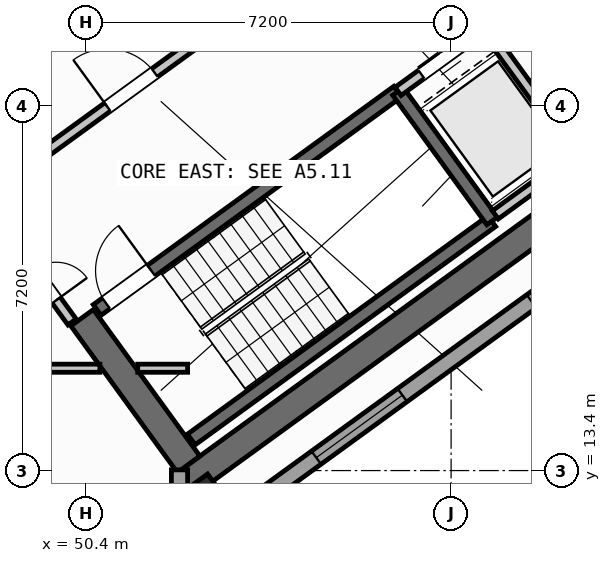
"""IFC4 building model, lengths in metres.
Left out: names, types, materials, properties, quantities, classifications, styles, units other than length and angle.
Written with IfcOpenShell. Run it as: python <this file> out.ifc"""

import sys

from ifc_helpers import new_model, si_unit, direction, frame, frame_2d, origin, origin_2d, place, context, subcontext, project, spatial, rectangle, hollow_rectangle, extrude, source, transform, mapped, element, fill, save


model = new_model("IFC4")
c1 = context("Model", 3, precision=1e-05, world=origin(), true_north=direction((0.0, 1.0)))
c2 = subcontext(c1, "Body", "Model", "MODEL_VIEW")
j1 = project(units=[si_unit("LENGTHUNIT", "METRE"), si_unit("PLANEANGLEUNIT", "RADIAN")], contexts=[c1])
p1 = place(None, origin())
s1 = spatial("IfcSite", under=j1, at=p1, CompositionType="ELEMENT")
p2 = place(p1, origin())
s2 = spatial("IfcBuilding", under=s1, at=p2, CompositionType="ELEMENT")
p3 = place(p2, frame((0.0, 0.0, 191.4)))
s3 = spatial("IfcBuildingStorey", under=s2, at=p3, CompositionType="ELEMENT", Elevation=191.4)
p4 = place(p3, frame((52.359, 13.14, 0.0), z_axis=(0.0, 0.0, 1.0), x_axis=(0.809014896919, 0.587788139183, 0.0)))
e1 = element("IfcWall", 1, at=p4, inside=s3, PredefinedType="SHEAR", context=c2, shape_type="SweptSolid", body=[
    extrude(rectangle(XDim=12.34, YDim=0.55, at=frame_2d((6.17, 0.0))), origin(), (0.0, 0.0, 1.0), 3.32),
])
p5 = place(p3, frame((52.42, 13.524, 0.0), z_axis=(0.0, 0.0, 1.0), x_axis=(-0.587802113096, 0.809004744015, 0.0)))
e2 = element("IfcWall", 2, at=p5, inside=s3, PredefinedType="SHEAR", context=c2, shape_type="SweptSolid", body=[
    extrude(rectangle(XDim=3.575, YDim=0.55, at=frame_2d((1.788, 0.0))), origin(), (0.0, 0.0, 1.0), 3.32),
])
m1 = source(origin(), c2, "Body", "SweptSolid", [
    extrude(hollow_rectangle(XDim=0.8, YDim=0.8, WallThickness=0.032, at=origin_2d()), origin(), (0.0, 0.0, 1.0), 3.6),
])
p6 = place(p3, frame((52.705, 12.773, 0.0), z_axis=(0.0, 0.0, 1.0), x_axis=(0.809016994375, 0.587785252292, 0.0)))
e3 = element("IfcColumn", 3, at=p6, inside=s3, PredefinedType="COLUMN", context=c2, shape_type="MappedRepresentation", body=[
    mapped(m1, transform((0.0, 0.0, 0.0), scale=1.0)),
])
p7 = place(p3, frame((67.454, 22.747, 0.0), z_axis=(0.0, 0.0, 1.0), x_axis=(-0.809021120468, -0.587779573171, 0.0)))
e4 = element("IfcWall", 4, at=p7, inside=s3, PredefinedType="STANDARD", context=c2, shape_type="SweptSolid", body=[
    extrude(rectangle(XDim=17.588, YDim=0.32, at=frame_2d((8.794, 0.0))), origin(), (0.0, 0.0, 1.0), 3.32),
])
p8 = place(p7, frame((1.624, 0.0, 0.0)))
e5 = element("IfcOpeningElement", 5, at=p8, cuts=e4, PredefinedType="OPENING", context=c2, shape_type="SweptSolid", body=[
    extrude(rectangle(XDim=1.05, YDim=2.15, at=frame_2d((0.525, 1.075))), frame((0.0, 0.17, 0.0), z_axis=(0.0, -1.0, 0.0), x_axis=(1.0, 0.0, 0.0)), (0.0, 0.0, 1.0), 0.34),
])
p9 = place(p7, frame((8.119, 0.0, 0.8)))
e6 = element("IfcOpeningElement", 6, at=p9, cuts=e4, PredefinedType="OPENING", context=c2, shape_type="SweptSolid", body=[
    extrude(rectangle(XDim=2.1, YDim=1.55, at=frame_2d((1.05, 0.775))), frame((0.0, 0.17, 0.0), z_axis=(0.0, -1.0, 0.0), x_axis=(1.0, 0.0, 0.0)), (0.0, 0.0, 1.0), 0.34),
])
p10 = place(p7, frame((13.369, 0.0, 0.8)))
e7 = element("IfcOpeningElement", 7, at=p10, cuts=e4, PredefinedType="OPENING", context=c2, shape_type="SweptSolid", body=[
    extrude(rectangle(XDim=2.1, YDim=1.55, at=frame_2d((1.05, 0.775))), frame((0.0, 0.17, 0.0), z_axis=(0.0, -1.0, 0.0), x_axis=(1.0, 0.0, 0.0)), (0.0, 0.0, 1.0), 0.34),
])
p11 = place(p3, frame((52.24, 13.414, 0.0), z_axis=(0.0, 0.0, 1.0), x_axis=(0.0, -1.0, 0.0)))
e8 = element("IfcWall", 8, at=p11, inside=s3, PredefinedType="STANDARD", context=c2, shape_type="SweptSolid", body=[
    extrude(rectangle(XDim=9.948, YDim=0.32, at=frame_2d((4.974, 0.0))), origin(), (0.0, 0.0, 1.0), 3.32),
])
p12 = place(p11, frame((2.296, 0.0, 0.8)))
e9 = element("IfcOpeningElement", 9, at=p12, cuts=e8, PredefinedType="OPENING", context=c2, shape_type="SweptSolid", body=[
    extrude(rectangle(XDim=2.1, YDim=1.55, at=frame_2d((1.05, 0.775))), frame((0.0, 0.17, 0.0), z_axis=(0.0, -1.0, 0.0), x_axis=(1.0, 0.0, 0.0)), (0.0, 0.0, 1.0), 0.34),
])
p13 = place(p11, frame((7.033, 0.0, 0.85)))
e10 = element("IfcOpeningElement", 10, at=p13, cuts=e8, PredefinedType="OPENING", context=c2, shape_type="SweptSolid", body=[
    extrude(rectangle(XDim=1.8, YDim=1.5, at=frame_2d((0.9, 0.75))), frame((0.0, 0.17, 0.0), z_axis=(0.0, -1.0, 0.0), x_axis=(1.0, 0.0, 0.0)), (0.0, 0.0, 1.0), 0.34),
])
p14 = place(p3, frame((52.472, 14.013, 0.0), z_axis=(0.0, 0.0, 1.0), x_axis=(0.809028366311, 0.587769599847, 0.0)))
e11 = element("IfcWall", 11, at=p14, inside=s3, PredefinedType="SHEAR", context=c2, shape_type="SweptSolid", body=[
    extrude(rectangle(XDim=7.33, YDim=0.26, at=frame_2d((3.665, 0.0))), origin(), (0.0, 0.0, 1.0), 3.32),
])
p15 = place(p3, frame((50.615, 16.57, 0.0), z_axis=(0.0, 0.0, 1.0), x_axis=(0.809028366311, 0.587769599847, 0.0)))
e12 = element("IfcWall", 12, at=p15, inside=s3, PredefinedType="SHEAR", context=c2, shape_type="SweptSolid", body=[
    extrude(rectangle(XDim=7.33, YDim=0.26, at=frame_2d((3.665, 0.0))), origin(), (0.0, 0.0, 1.0), 3.32),
])
p16 = place(p15, frame((0.22, 0.0, 0.0)))
e13 = element("IfcOpeningElement", 13, at=p16, cuts=e12, PredefinedType="OPENING", context=c2, shape_type="SweptSolid", body=[
    extrude(rectangle(XDim=1.1, YDim=2.1, at=frame_2d((0.55, 1.05))), frame((0.0, 0.14, 0.0), z_axis=(0.0, -1.0, 0.0), x_axis=(1.0, 0.0, 0.0)), (0.0, 0.0, 1.0), 0.28),
])
p17 = place(p3, frame((58.41, 18.327, 0.0), z_axis=(0.0, 0.0, 1.0), x_axis=(-0.58776738483, 0.809029975545, 0.0)))
e14 = element("IfcWall", 14, at=p17, inside=s3, PredefinedType="SHEAR", context=c2, shape_type="SweptSolid", body=[
    extrude(rectangle(XDim=3.16, YDim=0.26, at=frame_2d((1.58, 0.0))), origin(), (0.0, 0.0, 1.0), 3.32),
])
p18 = place(p3, frame((47.065, 21.407, 0.0), z_axis=(0.0, 0.0, 1.0), x_axis=(0.809032984992, 0.587763242466, 0.0)))
e15 = element("IfcWall", 15, at=p18, inside=s3, PredefinedType="STANDARD", context=c2, shape_type="SweptSolid", body=[
    extrude(rectangle(XDim=3.448, YDim=0.2, at=frame_2d((1.724, 0.0))), origin(), (0.0, 0.0, 1.0), 3.31),
])
p19 = place(p18, frame((0.458, 0.0, 0.0)))
e16 = element("IfcOpeningElement", 16, at=p19, cuts=e15, PredefinedType="OPENING", context=c2, shape_type="SweptSolid", body=[
    extrude(rectangle(XDim=1.3, YDim=2.2, at=frame_2d((0.65, 1.1))), frame((0.0, 0.11, 0.0), z_axis=(0.0, -1.0, 0.0), x_axis=(1.0, 0.0, 0.0)), (0.0, 0.0, 1.0), 0.22),
])
p20 = place(p3, frame((48.758, 19.077, 0.0), z_axis=(0.0, 0.0, 1.0), x_axis=(0.809005065155, 0.587801671104, 0.0)))
e17 = element("IfcWall", 17, at=p20, inside=s3, PredefinedType="STANDARD", context=c2, shape_type="SweptSolid", body=[
    extrude(rectangle(XDim=5.768, YDim=0.2, at=frame_2d((2.884, 0.0))), origin(), (0.0, 0.0, 1.0), 3.31),
])
p21 = place(p20, frame((2.548, 0.0, 0.0)))
e18 = element("IfcOpeningElement", 18, at=p21, cuts=e17, PredefinedType="OPENING", context=c2, shape_type="SweptSolid", body=[
    extrude(rectangle(XDim=1.15, YDim=2.1, at=frame_2d((0.575, 1.05))), frame((0.0, 0.11, 0.0), z_axis=(0.0, -1.0, 0.0), x_axis=(1.0, 0.0, 0.0)), (0.0, 0.0, 1.0), 0.22),
])
p22 = place(p3, frame((56.553, 20.884, 0.0), z_axis=(0.0, 0.0, 1.0), x_axis=(0.809023564264, 0.58777620951, 0.0)))
e19 = element("IfcWall", 19, at=p22, inside=s3, PredefinedType="STANDARD", context=c2, shape_type="SweptSolid", body=[
    extrude(rectangle(XDim=3.818, YDim=0.2, at=frame_2d((1.909, 0.0))), origin(), (0.0, 0.0, 1.0), 3.31),
])
p23 = place(p22, frame((0.57, 0.0, 0.0)))
e20 = element("IfcOpeningElement", 20, at=p23, cuts=e19, PredefinedType="OPENING", context=c2, shape_type="SweptSolid", body=[
    extrude(rectangle(XDim=1.1, YDim=2.15, at=frame_2d((0.55, 1.075))), frame((0.0, 0.11, 0.0), z_axis=(0.0, -1.0, 0.0), x_axis=(1.0, 0.0, 0.0)), (0.0, 0.0, 1.0), 0.22),
])
p24 = place(p22, frame((2.65, 0.0, 0.0)))
e21 = element("IfcOpeningElement", 21, at=p24, cuts=e19, PredefinedType="OPENING", context=c2, shape_type="SweptSolid", body=[
    extrude(rectangle(XDim=0.86, YDim=2.05, at=frame_2d((0.43, 1.025))), frame((0.0, 0.11, 0.0), z_axis=(0.0, -1.0, 0.0), x_axis=(1.0, 0.0, 0.0)), (0.0, 0.0, 1.0), 0.22),
])
p25 = place(p3, frame((60.067, 19.655, 0.0), z_axis=(0.0, 0.0, 1.0), x_axis=(-0.587800520745, 0.809005900975, 0.0)))
e22 = element("IfcWall", 22, at=p25, inside=s3, PredefinedType="STANDARD", context=c2, shape_type="SweptSolid", body=[
    extrude(rectangle(XDim=2.66, YDim=0.2, at=frame_2d((1.33, 0.0))), origin(), (0.0, 0.0, 1.0), 3.31),
])
p26 = place(p3, frame((58.472, 18.447, 0.0), z_axis=(0.0, 0.0, 1.0), x_axis=(0.809018631237, 0.587782999339, 0.0)))
e23 = element("IfcWall", 23, at=p26, inside=s3, PredefinedType="STANDARD", context=c2, shape_type="SweptSolid", body=[
    extrude(rectangle(XDim=3.698, YDim=0.2, at=frame_2d((1.849, 0.0))), origin(), (0.0, 0.0, 1.0), 3.31),
])
p27 = place(p3, frame((35.237, 15.42, 0.0), z_axis=(0.0, 0.0, 1.0), x_axis=(1.0, 0.0, 0.0)))
e24 = element("IfcWall", 24, at=p27, inside=s3, PredefinedType="PARTITIONING", context=c2, shape_type="SweptSolid", body=[
    extrude(rectangle(XDim=15.432, YDim=0.16, at=frame_2d((7.716, 0.0))), origin(), (0.0, 0.0, 1.0), 3.31),
])
p28 = place(p27, frame((0.969, 0.0, 0.0)))
e25 = element("IfcOpeningElement", 25, at=p28, cuts=e24, PredefinedType="OPENING", context=c2, shape_type="SweptSolid", body=[
    extrude(rectangle(XDim=1.0, YDim=2.1, at=frame_2d((0.5, 1.05))), frame((0.0, 0.09, 0.0), z_axis=(0.0, -1.0, 0.0), x_axis=(1.0, 0.0, 0.0)), (0.0, 0.0, 1.0), 0.18),
])
p29 = place(p27, frame((8.799, 0.0, 0.0)))
e26 = element("IfcOpeningElement", 26, at=p29, cuts=e24, PredefinedType="OPENING", context=c2, shape_type="SweptSolid", body=[
    extrude(rectangle(XDim=1.0, YDim=2.1, at=frame_2d((0.5, 1.05))), frame((0.0, 0.09, 0.0), z_axis=(0.0, -1.0, 0.0), x_axis=(1.0, 0.0, 0.0)), (0.0, 0.0, 1.0), 0.18),
])
p30 = place(p3, frame((51.416, 15.42, 0.0), z_axis=(0.0, 0.0, 1.0), x_axis=(1.0, 0.0, 0.0)))
e27 = element("IfcWall", 27, at=p30, inside=s3, PredefinedType="PARTITIONING", context=c2, shape_type="SweptSolid", body=[
    extrude(rectangle(XDim=0.984, YDim=0.16, at=frame_2d((0.492, 0.0))), origin(), (0.0, 0.0, 1.0), 3.31),
])
p31 = place(p3, frame((50.119, 16.333, 0.0), z_axis=(0.0, 0.0, 1.0), x_axis=(-0.587749856981, 0.809042709391, 0.0)))
e28 = element("IfcWall", 28, at=p31, inside=s3, PredefinedType="STANDARD", context=c2, shape_type="SweptSolid", body=[
    extrude(rectangle(XDim=2.96, YDim=0.2, at=frame_2d((1.48, 0.0))), origin(), (0.0, 0.0, 1.0), 3.31),
])
p32 = place(p31, frame((0.53, 0.0, 0.0)))
e29 = element("IfcOpeningElement", 29, at=p32, cuts=e28, PredefinedType="OPENING", context=c2, shape_type="SweptSolid", body=[
    extrude(rectangle(XDim=1.5, YDim=2.15, at=frame_2d((0.75, 1.075))), frame((0.0, 0.11, 0.0), z_axis=(0.0, -1.0, 0.0), x_axis=(1.0, 0.0, 0.0)), (0.0, 0.0, 1.0), 0.22),
])
m2 = source(origin(), c2, "Body", "SweptSolid", [
    extrude(rectangle(XDim=2.1, YDim=1.55, at=frame_2d((1.05, 0.775))), frame((0.0, 0.03, 0.0), z_axis=(0.0, -1.0, 0.0), x_axis=(1.0, 0.0, 0.0)), (0.0, 0.0, 1.0), 0.06),
])
p33 = place(p9, origin())
e30 = element("IfcWindow", 30, at=p33, inside=s3, PartitioningType="SINGLE_PANEL", PredefinedType="WINDOW", context=c2, shape_type="MappedRepresentation", body=[
    mapped(m2, transform((0.0, 0.0, 0.0), scale=1.0)),
])
fill(e6, e30)
p34 = place(p10, origin())
e31 = element("IfcWindow", 31, at=p34, inside=s3, PartitioningType="SINGLE_PANEL", PredefinedType="WINDOW", context=c2, shape_type="MappedRepresentation", body=[
    mapped(m2, transform((0.0, 0.0, 0.0), scale=1.0)),
])
fill(e7, e31)
m3 = source(origin(), c2, "Body", "SweptSolid", [
    extrude(rectangle(XDim=1.1, YDim=2.1, at=frame_2d((0.55, 1.05))), frame((0.0, 0.025, 0.0), z_axis=(0.0, -1.0, 0.0), x_axis=(1.0, 0.0, 0.0)), (0.0, 0.0, 1.0), 0.05),
])
p35 = place(p16, origin())
e32 = element("IfcDoor", 32, at=p35, inside=s3, OperationType="SINGLE_SWING_RIGHT", PredefinedType="DOOR", context=c2, shape_type="MappedRepresentation", body=[
    mapped(m3, transform((0.0, 0.0, 0.0), scale=1.0)),
])
fill(e13, e32)
m4 = source(origin(), c2, "Body", "SweptSolid", [
    extrude(rectangle(XDim=1.15, YDim=2.1, at=frame_2d((0.575, 1.05))), frame((0.0, 0.025, 0.0), z_axis=(0.0, -1.0, 0.0), x_axis=(1.0, 0.0, 0.0)), (0.0, 0.0, 1.0), 0.05),
])
p36 = place(p21, origin())
e33 = element("IfcDoor", 33, at=p36, inside=s3, OperationType="SINGLE_SWING_LEFT", PredefinedType="DOOR", context=c2, shape_type="MappedRepresentation", body=[
    mapped(m4, transform((0.0, 0.0, 0.0), scale=1.0)),
])
fill(e18, e33)
m5 = source(origin(), c2, "Body", "SweptSolid", [
    extrude(rectangle(XDim=1.1, YDim=2.15, at=frame_2d((0.55, 1.075))), frame((0.0, 0.025, 0.0), z_axis=(0.0, -1.0, 0.0), x_axis=(1.0, 0.0, 0.0)), (0.0, 0.0, 1.0), 0.05),
])
p37 = place(p23, origin())
e34 = element("IfcDoor", 34, at=p37, inside=s3, OperationType="DOUBLE_DOOR_SLIDING", PredefinedType="DOOR", context=c2, shape_type="MappedRepresentation", body=[
    mapped(m5, transform((0.0, 0.0, 0.0), scale=1.0)),
])
fill(e20, e34)
m6 = source(origin(), c2, "Body", "SweptSolid", [
    extrude(rectangle(XDim=1.5, YDim=2.15, at=frame_2d((0.75, 1.075))), frame((0.0, 0.025, 0.0), z_axis=(0.0, -1.0, 0.0), x_axis=(1.0, 0.0, 0.0)), (0.0, 0.0, 1.0), 0.05),
])
p38 = place(p32, frame((1.5, 0.0, 0.0), z_axis=(0.0, 0.0, 1.0), x_axis=(-1.0, 0.0, 0.0)))
e35 = element("IfcDoor", 35, at=p38, inside=s3, OperationType="DOUBLE_DOOR_SINGLE_SWING", PredefinedType="DOOR", context=c2, shape_type="MappedRepresentation", body=[
    mapped(m6, transform((0.0, 0.0, 0.0), scale=1.0)),
])
fill(e29, e35)
save(model, sys.argv[1])
